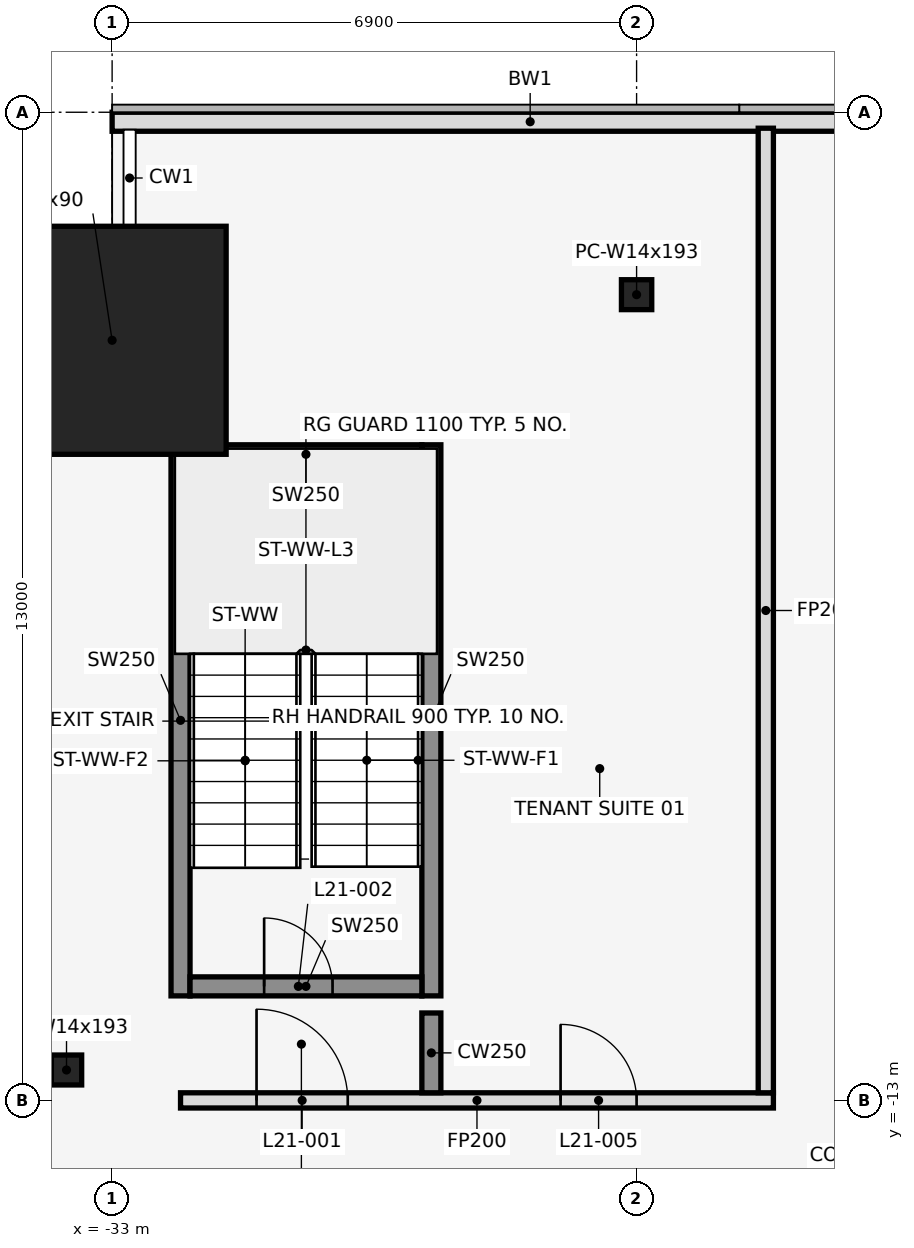
"""IFC4 building model, lengths in metres.
Left out: names, types, materials, properties, quantities, classifications, styles, units other than length and angle.
Written with IfcOpenShell. Run it as: python <this file> out.ifc"""

import sys

from ifc_helpers import new_model, si_unit, direction, frame, frame_2d, origin, origin_2d, place, context, subcontext, project, spatial, rectangle, hollow_rectangle, i_section, extrude, element, fill, save


model = new_model("IFC4")
c1 = context("Model", 3, precision=1e-05, world=origin(), true_north=direction((0.0, 1.0)))
c2 = subcontext(c1, "Body", "Model", "MODEL_VIEW")
j1 = project(units=[si_unit("LENGTHUNIT", "METRE"), si_unit("PLANEANGLEUNIT", "RADIAN")], contexts=[c1])
p1 = place(None, origin())
s1 = spatial("IfcSite", under=j1, at=p1, CompositionType="ELEMENT")
p2 = place(p1, origin())
s2 = spatial("IfcBuilding", under=s1, at=p2, CompositionType="ELEMENT")
p3 = place(p2, frame((0.0, 0.0, 102.2)))
s3 = spatial("IfcBuildingStorey", under=s2, at=p3, CompositionType="ELEMENT", Elevation=102.2)
p4 = place(p3, frame((-33.0, -3.0, 0.0), z_axis=(0.0, 0.0, 1.0), x_axis=(1.0, 0.0, 0.0)))
e1 = element("IfcColumn", 1, at=p4, inside=s3, PredefinedType="COLUMN", context=c2, shape_type="SweptSolid", body=[
    extrude(hollow_rectangle(XDim=3.0, YDim=3.0, WallThickness=0.09, at=origin_2d()), origin(), (0.0, 0.0, 1.0), 4.1),
])
for number, where, z_axis, x_axis in (
    (2, (-26.1, -2.4, 0.0), (0.0, 0.0, 1.0), (1.0, 0.0, 0.0)),
    (3, (-33.6, -12.6, 0.0), (0.0, 0.0, 1.0), (1.0, 0.0, 0.0)),
):
    element("IfcColumn", number, at=place(p3, frame(where, z_axis=z_axis, x_axis=x_axis)), inside=s3, PredefinedType="COLUMN", context=c2, shape_type="SweptSolid", body=[
        extrude(i_section(OverallWidth=0.399, OverallDepth=0.394, WebThickness=0.023, FlangeThickness=0.037, at=origin_2d()), origin(), (0.0, 0.0, 1.0), 4.1),
    ])
p5 = place(p3, frame((-22.0, -0.125, 0.0), z_axis=(0.0, 0.0, 1.0), x_axis=(-1.0, 0.0, 0.0)))
e4 = element("IfcWall", 4, at=p5, inside=s3, PredefinedType="STANDARD", context=c2, shape_type="SweptSolid", body=[
    extrude(rectangle(XDim=11.0, YDim=0.25, at=frame_2d((5.5, 0.0))), origin(), (0.0, 0.0, 1.0), 3.95),
])
for number, where, z_axis, x_axis in (
    (5, (-32.1, -11.625, 0.0), (0.0, 0.0, 1.0), (0.0, 1.0, 0.0)),
    (6, (-28.8, -11.625, 0.0), (0.0, 0.0, 1.0), (0.0, 1.0, 0.0)),
):
    element("IfcWall", number, at=place(p3, frame(where, z_axis=z_axis, x_axis=x_axis)), inside=s3, PredefinedType="SHEAR", context=c2, shape_type="SweptSolid", body=[
        extrude(rectangle(XDim=7.25, YDim=0.25, at=frame_2d((3.625, 0.0))), origin(), (0.0, 0.0, 1.0), 4.1),
    ])
p6 = place(p3, frame((-31.975, -11.5, 0.0), z_axis=(0.0, 0.0, 1.0), x_axis=(1.0, 0.0, 0.0)))
e7 = element("IfcWall", 7, at=p6, inside=s3, PredefinedType="SHEAR", context=c2, shape_type="SweptSolid", body=[
    extrude(rectangle(XDim=3.05, YDim=0.25, at=frame_2d((1.525, 0.0))), origin(), (0.0, 0.0, 1.0), 4.1),
])
p7 = place(p6, frame((0.975, 0.0, 0.0)))
e8 = element("IfcOpeningElement", 8, at=p7, cuts=e7, PredefinedType="OPENING", context=c2, shape_type="SweptSolid", body=[
    extrude(rectangle(XDim=0.9, YDim=2.1, at=frame_2d((0.45, 1.05))), frame((0.0, 0.137, 0.0), z_axis=(0.0, -1.0, 0.0), x_axis=(1.0, 0.0, 0.0)), (0.0, 0.0, 1.0), 0.274),
])
p8 = place(p3, frame((-31.975, -4.5, 0.0), z_axis=(0.0, 0.0, 1.0), x_axis=(1.0, 0.0, 0.0)))
e9 = element("IfcWall", 9, at=p8, inside=s3, PredefinedType="SHEAR", context=c2, shape_type="SweptSolid", body=[
    extrude(rectangle(XDim=3.05, YDim=0.25, at=frame_2d((1.525, 0.0))), origin(), (0.0, 0.0, 1.0), 4.1),
])
p9 = place(p3, frame((-32.1, -13.0, 0.0), z_axis=(0.0, 0.0, 1.0), x_axis=(1.0, 0.0, 0.0)))
e10 = element("IfcWall", 10, at=p9, inside=s3, PredefinedType="PARTITIONING", context=c2, shape_type="SweptSolid", body=[
    extrude(rectangle(XDim=7.8, YDim=0.2, at=frame_2d((3.9, 0.0))), origin(), (0.0, 0.0, 1.0), 3.018),
])
p10 = place(p9, frame((1.0, 0.0, 0.0)))
e11 = element("IfcOpeningElement", 11, at=p10, cuts=e10, PredefinedType="OPENING", context=c2, shape_type="SweptSolid", body=[
    extrude(rectangle(XDim=1.2, YDim=2.1, at=frame_2d((0.6, 1.05))), frame((0.0, 0.112, 0.0), z_axis=(0.0, -1.0, 0.0), x_axis=(1.0, 0.0, 0.0)), (0.0, 0.0, 1.0), 0.224),
])
p11 = place(p9, frame((5.0, 0.0, 0.0)))
e12 = element("IfcOpeningElement", 12, at=p11, cuts=e10, PredefinedType="OPENING", context=c2, shape_type="SweptSolid", body=[
    extrude(rectangle(XDim=1.0, YDim=2.1, at=frame_2d((0.5, 1.05))), frame((0.0, 0.112, 0.0), z_axis=(0.0, -1.0, 0.0), x_axis=(1.0, 0.0, 0.0)), (0.0, 0.0, 1.0), 0.224),
])
p12 = place(p3, frame((-28.8, -12.9, 0.0), z_axis=(0.0, 0.0, 1.0), x_axis=(0.0, 1.0, 0.0)))
e13 = element("IfcWall", 13, at=p12, inside=s3, PredefinedType="SHEAR", context=c2, shape_type="SweptSolid", body=[
    extrude(rectangle(XDim=1.05, YDim=0.25, at=frame_2d((0.525, 0.0))), origin(), (0.0, 0.0, 1.0), 4.1),
])
p13 = place(p3, frame((-24.4, -12.9, 0.0), z_axis=(0.0, 0.0, 1.0), x_axis=(0.0, 1.0, 0.0)))
e14 = element("IfcWall", 14, at=p13, inside=s3, PredefinedType="PARTITIONING", context=c2, shape_type="SweptSolid", body=[
    extrude(rectangle(XDim=12.69, YDim=0.2, at=frame_2d((6.345, 0.0))), origin(), (0.0, 0.0, 1.0), 3.018),
])
p14 = place(p10, origin())
e15 = element("IfcDoor", 15, at=p14, inside=s3, OperationType="SINGLE_SWING_LEFT", PredefinedType="DOOR", context=c2, shape_type="SweptSolid", body=[
    extrude(rectangle(XDim=1.2, YDim=2.1, at=frame_2d((0.6, 1.05))), frame((0.0, 0.025, 0.0), z_axis=(0.0, -1.0, 0.0), x_axis=(1.0, 0.0, 0.0)), (0.0, 0.0, 1.0), 0.05),
])
fill(e11, e15)
p15 = place(p7, origin())
e16 = element("IfcDoor", 16, at=p15, inside=s3, OperationType="SINGLE_SWING_LEFT", PredefinedType="DOOR", context=c2, shape_type="SweptSolid", body=[
    extrude(rectangle(XDim=0.9, YDim=2.1, at=frame_2d((0.45, 1.05))), frame((0.0, 0.025, 0.0), z_axis=(0.0, -1.0, 0.0), x_axis=(1.0, 0.0, 0.0)), (0.0, 0.0, 1.0), 0.05),
])
fill(e8, e16)
p16 = place(p11, origin())
e17 = element("IfcDoor", 17, at=p16, inside=s3, OperationType="SINGLE_SWING_LEFT", PredefinedType="DOOR", context=c2, shape_type="SweptSolid", body=[
    extrude(rectangle(XDim=1.0, YDim=2.1, at=frame_2d((0.5, 1.05))), frame((0.0, 0.025, 0.0), z_axis=(0.0, -1.0, 0.0), x_axis=(1.0, 0.0, 0.0)), (0.0, 0.0, 1.0), 0.05),
])
fill(e12, e17)
save(model, sys.argv[1])
